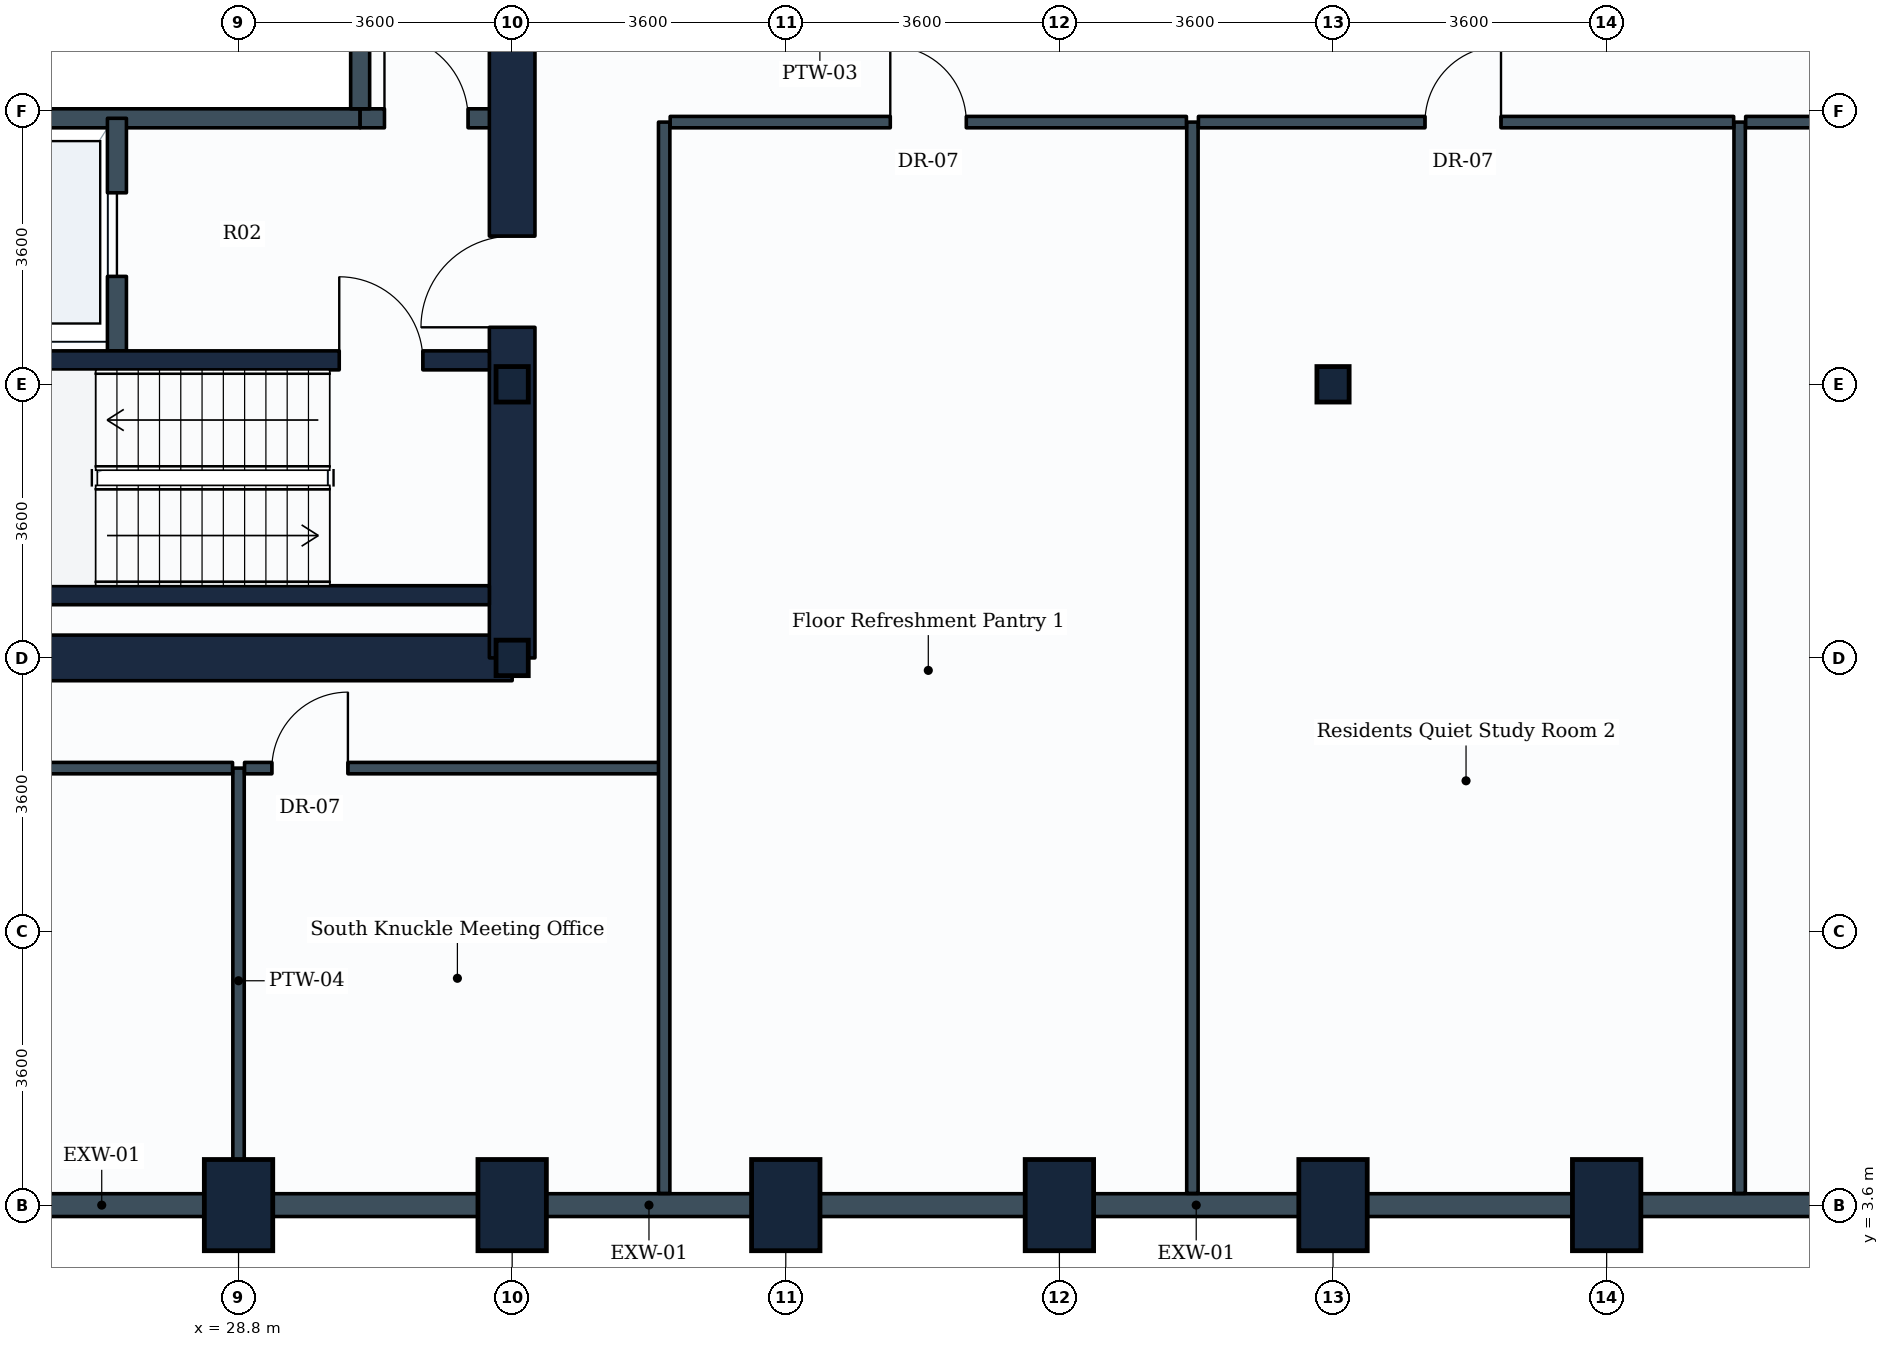
"""IFC4 building model, lengths in metres.
Left out: names, types, materials, properties, quantities, classifications, styles, units other than length and angle.
Written with IfcOpenShell. Run it as: python <this file> out.ifc"""

import sys

from ifc_helpers import new_model, si_unit, direction, frame, frame_2d, origin, origin_2d, place, context, subcontext, project, spatial, rectangle, i_section, extrude, element, fill, save


model = new_model("IFC4")
c1 = context("Model", 3, precision=1e-05, world=origin(), true_north=direction((0.0, 1.0)))
c2 = subcontext(c1, "Body", "Model", "MODEL_VIEW")
j1 = project(units=[si_unit("LENGTHUNIT", "METRE"), si_unit("PLANEANGLEUNIT", "RADIAN")], contexts=[c1])
p1 = place(None, origin())
s1 = spatial("IfcSite", under=j1, at=p1, CompositionType="ELEMENT")
p2 = place(p1, origin())
s2 = spatial("IfcBuilding", under=s1, at=p2, CompositionType="ELEMENT")
p3 = place(p2, frame((0.0, 0.0, 51.3)))
s3 = spatial("IfcBuildingStorey", under=s2, at=p3, CompositionType="ELEMENT", Elevation=51.3)
for number, where, z_axis, x_axis in (
    (1, (28.8, 3.6, 0.0), (0.0, 0.0, 1.0), (1.0, 0.0, 0.0)),
    (2, (32.4, 3.6, 0.0), (0.0, 0.0, 1.0), (1.0, 0.0, 0.0)),
):
    element("IfcColumn", number, at=place(p3, frame(where, z_axis=z_axis, x_axis=x_axis)), inside=s3, PredefinedType="COLUMN", context=c2, shape_type="SweptSolid", body=[
        extrude(rectangle(XDim=0.9, YDim=1.2, at=origin_2d()), origin(), (0.0, 0.0, 1.0), 3.9),
    ])
for number, where, z_axis, x_axis in (
    (3, (32.4, 10.8, 0.0), (0.0, 0.0, 1.0), (1.0, 0.0, 0.0)),
    (4, (32.4, 14.4, 0.0), (0.0, 0.0, 1.0), (1.0, 0.0, 0.0)),
):
    element("IfcColumn", number, at=place(p3, frame(where, z_axis=z_axis, x_axis=x_axis)), inside=s3, PredefinedType="COLUMN", context=c2, shape_type="SweptSolid", body=[
        extrude(i_section(OverallWidth=0.424, OverallDepth=0.467, WebThickness=0.033, FlangeThickness=0.053, FilletRadius=0.015, at=origin_2d()), origin(), (0.0, 0.0, 1.0), 3.9),
    ])
for number, where, z_axis, x_axis in (
    (5, (36.0, 3.6, 0.0), (0.0, 0.0, 1.0), (1.0, 0.0, 0.0)),
    (6, (39.6, 3.6, 0.0), (0.0, 0.0, 1.0), (1.0, 0.0, 0.0)),
    (7, (43.2, 3.6, 0.0), (0.0, 0.0, 1.0), (1.0, 0.0, 0.0)),
):
    element("IfcColumn", number, at=place(p3, frame(where, z_axis=z_axis, x_axis=x_axis)), inside=s3, PredefinedType="COLUMN", context=c2, shape_type="SweptSolid", body=[
        extrude(rectangle(XDim=0.9, YDim=1.2, at=origin_2d()), origin(), (0.0, 0.0, 1.0), 3.9),
    ])
p4 = place(p3, frame((43.2, 14.4, 0.0), z_axis=(0.0, 0.0, 1.0), x_axis=(1.0, 0.0, 0.0)))
e8 = element("IfcColumn", 8, at=p4, inside=s3, PredefinedType="COLUMN", context=c2, shape_type="SweptSolid", body=[
    extrude(i_section(OverallWidth=0.424, OverallDepth=0.467, WebThickness=0.033, FlangeThickness=0.053, FilletRadius=0.015, at=origin_2d()), origin(), (0.0, 0.0, 1.0), 3.9),
])
p5 = place(p3, frame((46.8, 3.6, 0.0), z_axis=(0.0, 0.0, 1.0), x_axis=(1.0, 0.0, 0.0)))
e9 = element("IfcColumn", 9, at=p5, inside=s3, PredefinedType="COLUMN", context=c2, shape_type="SweptSolid", body=[
    extrude(rectangle(XDim=0.9, YDim=1.2, at=origin_2d()), origin(), (0.0, 0.0, 1.0), 3.9),
])
p6 = place(p3, frame((28.8, 3.6, 0.0), z_axis=(0.0, 0.0, 1.0), x_axis=(-1.0, 0.0, 0.0)))
e10 = element("IfcWall", 10, at=p6, inside=s3, PredefinedType="STANDARD", context=c2, shape_type="SweptSolid", body=[
    extrude(rectangle(XDim=3.6, YDim=0.3, at=frame_2d((1.8, 0.0))), origin(), (0.0, 0.0, 1.0), 2.93),
])
p7 = place(p3, frame((32.4, 3.6, 0.0), z_axis=(0.0, 0.0, 1.0), x_axis=(-1.0, 0.0, 0.0)))
e11 = element("IfcWall", 11, at=p7, inside=s3, PredefinedType="STANDARD", context=c2, shape_type="SweptSolid", body=[
    extrude(rectangle(XDim=3.6, YDim=0.3, at=frame_2d((1.8, 0.0))), origin(), (0.0, 0.0, 1.0), 2.93),
])
for number, where, z_axis, x_axis in (
    (12, (36.0, 3.6, 0.0), (0.0, 0.0, 1.0), (-1.0, 0.0, 0.0)),
    (13, (39.6, 3.6, 0.0), (0.0, 0.0, 1.0), (-1.0, 0.0, 0.0)),
):
    element("IfcWall", number, at=place(p3, frame(where, z_axis=z_axis, x_axis=x_axis)), inside=s3, PredefinedType="STANDARD", context=c2, shape_type="SweptSolid", body=[
        extrude(rectangle(XDim=3.6, YDim=0.3, at=frame_2d((1.8, 0.0))), origin(), (0.0, 0.0, 1.0), 2.93),
    ])
p8 = place(p3, frame((43.2, 3.6, 0.0), z_axis=(0.0, 0.0, 1.0), x_axis=(-1.0, 0.0, 0.0)))
e14 = element("IfcWall", 14, at=p8, inside=s3, PredefinedType="STANDARD", context=c2, shape_type="SweptSolid", body=[
    extrude(rectangle(XDim=3.6, YDim=0.3, at=frame_2d((1.8, 0.0))), origin(), (0.0, 0.0, 1.0), 2.93),
])
p9 = place(p3, frame((46.8, 3.6, 0.0), z_axis=(0.0, 0.0, 1.0), x_axis=(-1.0, 0.0, 0.0)))
e15 = element("IfcWall", 15, at=p9, inside=s3, PredefinedType="STANDARD", context=c2, shape_type="SweptSolid", body=[
    extrude(rectangle(XDim=3.6, YDim=0.3, at=frame_2d((1.8, 0.0))), origin(), (0.0, 0.0, 1.0), 2.93),
])
p10 = place(p3, frame((50.4, 3.6, 0.0), z_axis=(0.0, 0.0, 1.0), x_axis=(-1.0, 0.0, 0.0)))
e16 = element("IfcWall", 16, at=p10, inside=s3, PredefinedType="STANDARD", context=c2, shape_type="SweptSolid", body=[
    extrude(rectangle(XDim=3.6, YDim=0.3, at=frame_2d((1.8, 0.0))), origin(), (0.0, 0.0, 1.0), 2.93),
])
p11 = place(p3, frame((14.4, 10.8, 0.0), z_axis=(0.0, 0.0, 1.0), x_axis=(1.0, 0.0, 0.0)))
e17 = element("IfcWall", 17, at=p11, inside=s3, PredefinedType="SHEAR", context=c2, shape_type="SweptSolid", body=[
    extrude(rectangle(XDim=18.0, YDim=0.6, at=frame_2d((9.0, 0.0))), origin(), (0.0, 0.0, 1.0), 3.65),
])
p12 = place(p3, frame((32.4, 10.8, 0.0), z_axis=(0.0, 0.0, 1.0), x_axis=(0.0, 1.0, 0.0)))
e18 = element("IfcWall", 18, at=p12, inside=s3, PredefinedType="SHEAR", context=c2, shape_type="SweptSolid", body=[
    extrude(rectangle(XDim=14.4, YDim=0.6, at=frame_2d((7.2, 0.0))), origin(), (0.0, 0.0, 1.0), 3.65),
])
p13 = place(p12, frame((4.35, 0.0, 0.0)))
e19 = element("IfcOpeningElement", 19, at=p13, cuts=e18, PredefinedType="OPENING", context=c2, shape_type="SweptSolid", body=[
    extrude(rectangle(XDim=1.2, YDim=2.1, at=frame_2d((0.6, 1.05))), frame((0.0, 0.31, 0.0), z_axis=(0.0, -1.0, 0.0), x_axis=(1.0, 0.0, 0.0)), (0.0, 0.0, 1.0), 0.62),
])
p14 = place(p12, frame((10.0, 0.0, 0.0)))
e20 = element("IfcOpeningElement", 20, at=p14, cuts=e18, PredefinedType="OPENING", context=c2, shape_type="SweptSolid", body=[
    extrude(rectangle(XDim=1.2, YDim=2.1, at=frame_2d((0.6, 1.05))), frame((0.0, 0.31, 0.0), z_axis=(0.0, -1.0, 0.0), x_axis=(1.0, 0.0, 0.0)), (0.0, 0.0, 1.0), 0.62),
])
p15 = place(p3, frame((23.35, 11.625, 0.0), z_axis=(0.0, 0.0, 1.0), x_axis=(1.0, 0.0, 0.0)))
e21 = element("IfcWall", 21, at=p15, inside=s3, PredefinedType="SHEAR", context=c2, shape_type="SweptSolid", body=[
    extrude(rectangle(XDim=8.75, YDim=0.25, at=frame_2d((4.375, 0.0))), origin(), (0.0, 0.0, 1.0), 3.65),
])
p16 = place(p3, frame((23.35, 14.715, 0.0), z_axis=(0.0, 0.0, 1.0), x_axis=(1.0, 0.0, 0.0)))
e22 = element("IfcWall", 22, at=p16, inside=s3, PredefinedType="SHEAR", context=c2, shape_type="SweptSolid", body=[
    extrude(rectangle(XDim=8.75, YDim=0.25, at=frame_2d((4.375, 0.0))), origin(), (0.0, 0.0, 1.0), 3.65),
])
p17 = place(p16, frame((6.775, 0.0, 0.0)))
e23 = element("IfcOpeningElement", 23, at=p17, cuts=e22, PredefinedType="OPENING", context=c2, shape_type="SweptSolid", body=[
    extrude(rectangle(XDim=1.1, YDim=2.1, at=frame_2d((0.55, 1.05))), frame((0.0, 0.135, 0.0), z_axis=(0.0, -1.0, 0.0), x_axis=(1.0, 0.0, 0.0)), (0.0, 0.0, 1.0), 0.27),
])
p18 = place(p3, frame((21.88, 17.9, 0.0), z_axis=(0.0, 0.0, 1.0), x_axis=(1.0, 0.0, 0.0)))
e24 = element("IfcWall", 24, at=p18, inside=s3, PredefinedType="PARTITIONING", context=c2, shape_type="SweptSolid", body=[
    extrude(rectangle(XDim=8.52, YDim=0.25, at=frame_2d((4.26, 0.0))), origin(), (0.0, 0.0, 1.0), 3.635),
])
p19 = place(p3, frame((30.4, 17.9, 0.0), z_axis=(0.0, 0.0, 1.0), x_axis=(1.0, 0.0, 0.0)))
e25 = element("IfcWall", 25, at=p19, inside=s3, PredefinedType="PARTITIONING", context=c2, shape_type="SweptSolid", body=[
    extrude(rectangle(XDim=1.75, YDim=0.25, at=frame_2d((0.875, 0.0))), origin(), (0.0, 0.0, 1.0), 3.635),
])
p20 = place(p19, frame((0.32, 0.0, 0.0)))
e26 = element("IfcOpeningElement", 26, at=p20, cuts=e25, PredefinedType="OPENING", context=c2, shape_type="SweptSolid", body=[
    extrude(rectangle(XDim=1.1, YDim=2.1, at=frame_2d((0.55, 1.05))), frame((0.0, 0.135, 0.0), z_axis=(0.0, -1.0, 0.0), x_axis=(1.0, 0.0, 0.0)), (0.0, 0.0, 1.0), 0.27),
])
p21 = place(p3, frame((27.2, 14.84, 0.0), z_axis=(0.0, 0.0, 1.0), x_axis=(0.0, 1.0, 0.0)))
e27 = element("IfcWall", 27, at=p21, inside=s3, PredefinedType="PARTITIONING", context=c2, shape_type="SweptSolid", body=[
    extrude(rectangle(XDim=3.06, YDim=0.25, at=frame_2d((1.53, 0.0))), origin(), (0.0, 0.0, 1.0), 3.635),
])
p22 = place(p21, frame((0.98, 0.0, 0.0)))
e28 = element("IfcOpeningElement", 28, at=p22, cuts=e27, PredefinedType="OPENING", context=c2, shape_type="SweptSolid", body=[
    extrude(rectangle(XDim=1.1, YDim=2.1, at=frame_2d((0.55, 1.05))), frame((0.0, 0.135, 0.0), z_axis=(0.0, -1.0, 0.0), x_axis=(1.0, 0.0, 0.0)), (0.0, 0.0, 1.0), 0.27),
])
p23 = place(p3, frame((30.4, 18.025, 0.0), z_axis=(0.0, 0.0, 1.0), x_axis=(0.0, 1.0, 0.0)))
e29 = element("IfcWall", 29, at=p23, inside=s3, PredefinedType="PARTITIONING", context=c2, shape_type="SweptSolid", body=[
    extrude(rectangle(XDim=2.27, YDim=0.25, at=frame_2d((1.135, 0.0))), origin(), (0.0, 0.0, 1.0), 3.635),
])
p24 = place(p3, frame((28.8, 9.35, 0.0), z_axis=(0.0, 0.0, 1.0), x_axis=(0.0, -1.0, 0.0)))
e30 = element("IfcWall", 30, at=p24, inside=s3, PredefinedType="PARTITIONING", context=c2, shape_type="SweptSolid", body=[
    extrude(rectangle(XDim=5.596, YDim=0.15, at=frame_2d((2.798, 0.0))), origin(), (0.0, 0.0, 1.0), 3.635),
])
p25 = place(p3, frame((12.95, 9.35, 0.0), z_axis=(0.0, 0.0, 1.0), x_axis=(1.0, 0.0, 0.0)))
e31 = element("IfcWall", 31, at=p25, inside=s3, PredefinedType="PARTITIONING", context=c2, shape_type="SweptSolid", body=[
    extrude(rectangle(XDim=15.771, YDim=0.15, at=frame_2d((7.885, 0.0))), origin(), (0.0, 0.0, 1.0), 3.04),
])
p26 = place(p25, frame((4.836, 0.0, 0.0)))
e32 = element("IfcOpeningElement", 32, at=p26, cuts=e31, PredefinedType="OPENING", context=c2, shape_type="SweptSolid", body=[
    extrude(rectangle(XDim=1.0, YDim=2.1, at=frame_2d((0.5, 1.05))), frame((0.0, 0.085, 0.0), z_axis=(0.0, -1.0, 0.0), x_axis=(1.0, 0.0, 0.0)), (0.0, 0.0, 1.0), 0.17),
])
p27 = place(p3, frame((28.879, 9.35, 0.0), z_axis=(0.0, 0.0, 1.0), x_axis=(1.0, 0.0, 0.0)))
e33 = element("IfcWall", 33, at=p27, inside=s3, PredefinedType="PARTITIONING", context=c2, shape_type="SweptSolid", body=[
    extrude(rectangle(XDim=5.521, YDim=0.15, at=frame_2d((2.76, 0.0))), origin(), (0.0, 0.0, 1.0), 3.635),
])
p28 = place(p27, frame((0.36, 0.0, 0.0)))
e34 = element("IfcOpeningElement", 34, at=p28, cuts=e33, PredefinedType="OPENING", context=c2, shape_type="SweptSolid", body=[
    extrude(rectangle(XDim=1.0, YDim=2.1, at=frame_2d((0.5, 1.05))), frame((0.0, 0.085, 0.0), z_axis=(0.0, -1.0, 0.0), x_axis=(1.0, 0.0, 0.0)), (0.0, 0.0, 1.0), 0.17),
])
for number, where, z_axis, x_axis in (
    (35, (34.4, 3.754, 0.0), (0.0, 0.0, 1.0), (0.0, 1.0, 0.0)),
    (36, (41.35, 3.754, 0.0), (0.0, 0.0, 1.0), (0.0, 1.0, 0.0)),
):
    element("IfcWall", number, at=place(p3, frame(where, z_axis=z_axis, x_axis=x_axis)), inside=s3, PredefinedType="PARTITIONING", context=c2, shape_type="SweptSolid", body=[
        extrude(rectangle(XDim=14.096, YDim=0.15, at=frame_2d((7.048, 0.0))), origin(), (0.0, 0.0, 1.0), 2.93),
    ])
p29 = place(p3, frame((34.479, 17.85, 0.0), z_axis=(0.0, 0.0, 1.0), x_axis=(1.0, 0.0, 0.0)))
e37 = element("IfcWall", 37, at=p29, inside=s3, PredefinedType="PARTITIONING", context=c2, shape_type="SweptSolid", body=[
    extrude(rectangle(XDim=6.792, YDim=0.15, at=frame_2d((3.396, 0.0))), origin(), (0.0, 0.0, 1.0), 3.04),
])
p30 = place(p29, frame((2.896, 0.0, 0.0)))
e38 = element("IfcOpeningElement", 38, at=p30, cuts=e37, PredefinedType="OPENING", context=c2, shape_type="SweptSolid", body=[
    extrude(rectangle(XDim=1.0, YDim=2.1, at=frame_2d((0.5, 1.05))), frame((0.0, 0.085, 0.0), z_axis=(0.0, -1.0, 0.0), x_axis=(1.0, 0.0, 0.0)), (0.0, 0.0, 1.0), 0.17),
])
p31 = place(p3, frame((48.55, 3.754, 0.0), z_axis=(0.0, 0.0, 1.0), x_axis=(0.0, 1.0, 0.0)))
e39 = element("IfcWall", 39, at=p31, inside=s3, PredefinedType="PARTITIONING", context=c2, shape_type="SweptSolid", body=[
    extrude(rectangle(XDim=14.096, YDim=0.15, at=frame_2d((7.048, 0.0))), origin(), (0.0, 0.0, 1.0), 2.93),
])
p32 = place(p3, frame((41.429, 17.85, 0.0), z_axis=(0.0, 0.0, 1.0), x_axis=(1.0, 0.0, 0.0)))
e40 = element("IfcWall", 40, at=p32, inside=s3, PredefinedType="PARTITIONING", context=c2, shape_type="SweptSolid", body=[
    extrude(rectangle(XDim=7.042, YDim=0.15, at=frame_2d((3.521, 0.0))), origin(), (0.0, 0.0, 1.0), 3.03),
])
p33 = place(p32, frame((2.981, 0.0, 0.0)))
e41 = element("IfcOpeningElement", 41, at=p33, cuts=e40, PredefinedType="OPENING", context=c2, shape_type="SweptSolid", body=[
    extrude(rectangle(XDim=1.0, YDim=2.1, at=frame_2d((0.5, 1.05))), frame((0.0, 0.085, 0.0), z_axis=(0.0, -1.0, 0.0), x_axis=(1.0, 0.0, 0.0)), (0.0, 0.0, 1.0), 0.17),
])
p34 = place(p3, frame((48.629, 17.85, 0.0), z_axis=(0.0, 0.0, 1.0), x_axis=(1.0, 0.0, 0.0)))
e42 = element("IfcWall", 42, at=p34, inside=s3, PredefinedType="PARTITIONING", context=c2, shape_type="SweptSolid", body=[
    extrude(rectangle(XDim=7.171, YDim=0.15, at=frame_2d((3.585, 0.0))), origin(), (0.0, 0.0, 1.0), 3.04),
])
p35 = place(p34, frame((3.046, 0.0, 0.0)))
e43 = element("IfcOpeningElement", 43, at=p35, cuts=e42, PredefinedType="OPENING", context=c2, shape_type="SweptSolid", body=[
    extrude(rectangle(XDim=1.0, YDim=2.1, at=frame_2d((0.5, 1.05))), frame((0.0, 0.085, 0.0), z_axis=(0.0, -1.0, 0.0), x_axis=(1.0, 0.0, 0.0)), (0.0, 0.0, 1.0), 0.17),
])
p36 = place(p17, origin())
e44 = element("IfcDoor", 44, at=p36, inside=s3, OperationType="SINGLE_SWING_LEFT", PredefinedType="DOOR", context=c2, shape_type="SweptSolid", body=[
    extrude(rectangle(XDim=1.1, YDim=2.1, at=frame_2d((0.55, 1.05))), frame((0.0, 0.025, 0.0), z_axis=(0.0, -1.0, 0.0), x_axis=(1.0, 0.0, 0.0)), (0.0, 0.0, 1.0), 0.05),
])
fill(e23, e44)
p37 = place(p22, origin())
e45 = element("IfcDoor", 45, at=p37, inside=s3, OperationType="SLIDING_TO_LEFT", PredefinedType="DOOR", context=c2, shape_type="SweptSolid", body=[
    extrude(rectangle(XDim=1.1, YDim=2.1, at=frame_2d((0.55, 1.05))), frame((0.0, 0.025, 0.0), z_axis=(0.0, -1.0, 0.0), x_axis=(1.0, 0.0, 0.0)), (0.0, 0.0, 1.0), 0.05),
])
fill(e28, e45)
p38 = place(p13, origin())
e46 = element("IfcDoor", 46, at=p38, inside=s3, OperationType="SINGLE_SWING_LEFT", PredefinedType="DOOR", context=c2, shape_type="SweptSolid", body=[
    extrude(rectangle(XDim=1.2, YDim=2.1, at=frame_2d((0.6, 1.05))), frame((0.0, 0.025, 0.0), z_axis=(0.0, -1.0, 0.0), x_axis=(1.0, 0.0, 0.0)), (0.0, 0.0, 1.0), 0.05),
])
fill(e19, e46)
p39 = place(p20, origin())
e47 = element("IfcDoor", 47, at=p39, inside=s3, OperationType="SINGLE_SWING_LEFT", PredefinedType="DOOR", context=c2, shape_type="SweptSolid", body=[
    extrude(rectangle(XDim=1.1, YDim=2.1, at=frame_2d((0.55, 1.05))), frame((0.0, 0.025, 0.0), z_axis=(0.0, -1.0, 0.0), x_axis=(1.0, 0.0, 0.0)), (0.0, 0.0, 1.0), 0.05),
])
fill(e26, e47)
p40 = place(p28, origin())
e48 = element("IfcDoor", 48, at=p40, inside=s3, OperationType="SINGLE_SWING_RIGHT", PredefinedType="DOOR", context=c2, shape_type="SweptSolid", body=[
    extrude(rectangle(XDim=1.0, YDim=2.1, at=frame_2d((0.5, 1.05))), frame((0.0, 0.025, 0.0), z_axis=(0.0, -1.0, 0.0), x_axis=(1.0, 0.0, 0.0)), (0.0, 0.0, 1.0), 0.05),
])
fill(e34, e48)
p41 = place(p30, origin())
e49 = element("IfcDoor", 49, at=p41, inside=s3, OperationType="SINGLE_SWING_LEFT", PredefinedType="DOOR", context=c2, shape_type="SweptSolid", body=[
    extrude(rectangle(XDim=1.0, YDim=2.1, at=frame_2d((0.5, 1.05))), frame((0.0, 0.025, 0.0), z_axis=(0.0, -1.0, 0.0), x_axis=(1.0, 0.0, 0.0)), (0.0, 0.0, 1.0), 0.05),
])
fill(e38, e49)
p42 = place(p33, origin())
e50 = element("IfcDoor", 50, at=p42, inside=s3, OperationType="SINGLE_SWING_RIGHT", PredefinedType="DOOR", context=c2, shape_type="SweptSolid", body=[
    extrude(rectangle(XDim=1.0, YDim=2.1, at=frame_2d((0.5, 1.05))), frame((0.0, 0.025, 0.0), z_axis=(0.0, -1.0, 0.0), x_axis=(1.0, 0.0, 0.0)), (0.0, 0.0, 1.0), 0.05),
])
fill(e41, e50)
save(model, sys.argv[1])
